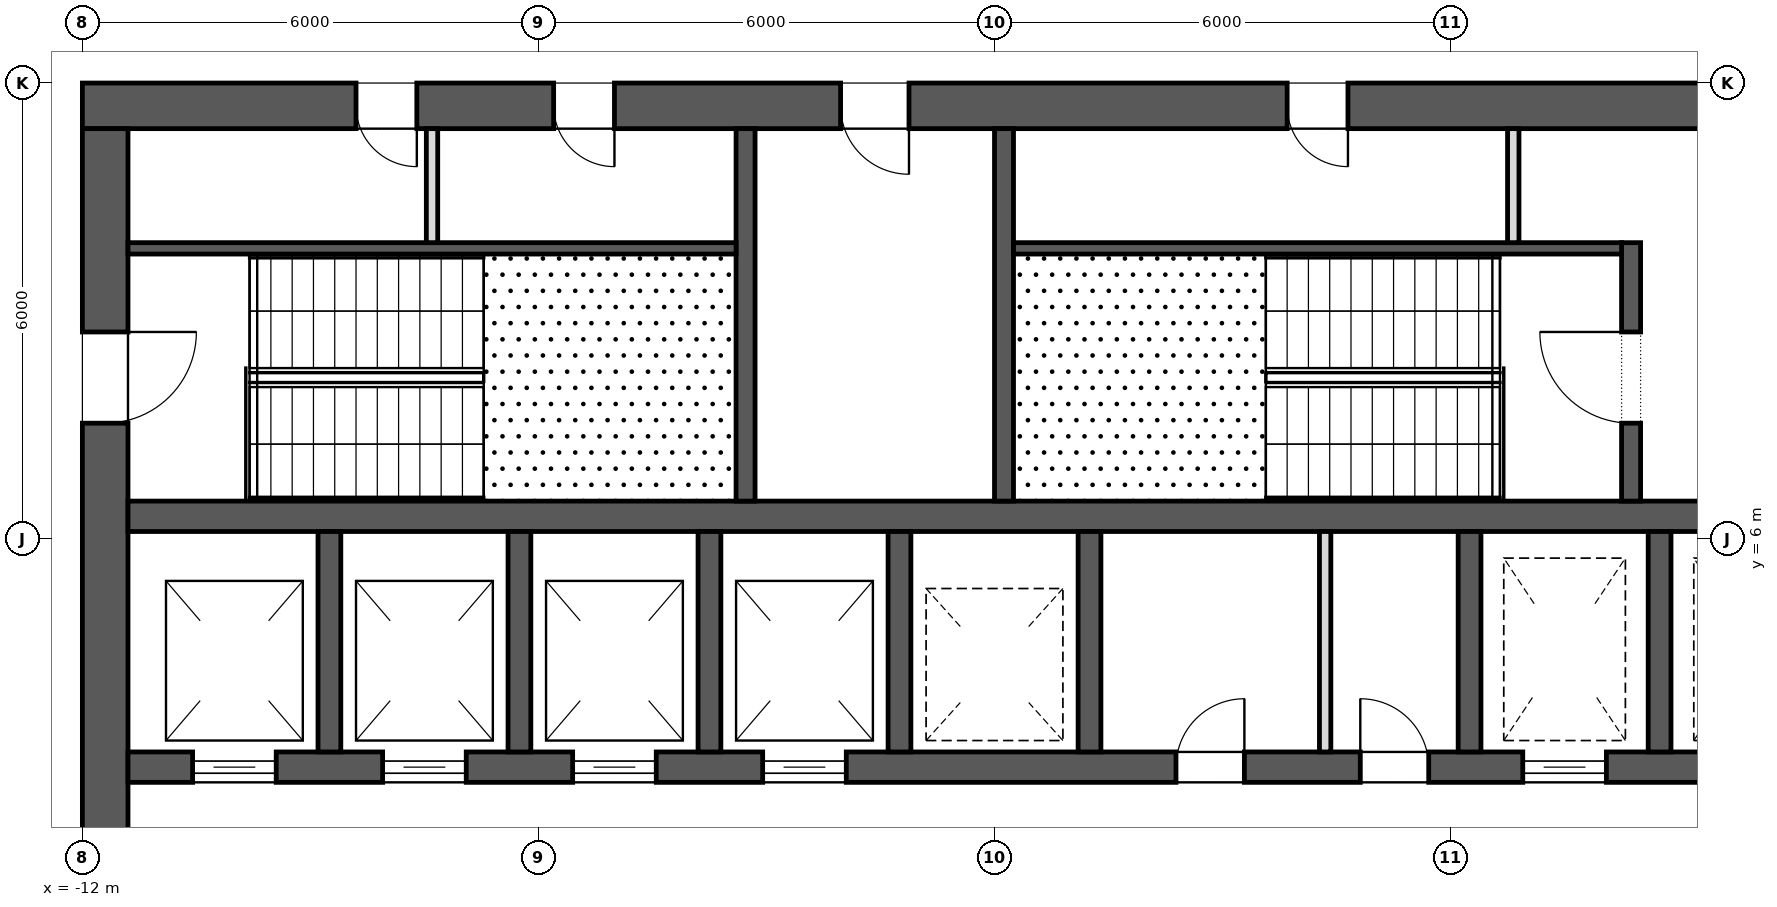
"""IFC4 building model, lengths in metres.
Left out: names, types, materials, properties, quantities, classifications, styles, units other than length and angle.
Written with IfcOpenShell. Run it as: python <this file> out.ifc"""

import sys

from ifc_helpers import new_model, si_unit, direction, frame, frame_2d, origin, place, context, subcontext, project, spatial, rectangle, extrude, element, fill, save


model = new_model("IFC4")
c1 = context("Model", 3, precision=1e-05, world=origin(), true_north=direction((0.0, 1.0)))
c2 = subcontext(c1, "Body", "Model", "MODEL_VIEW")
j1 = project(units=[si_unit("LENGTHUNIT", "METRE"), si_unit("PLANEANGLEUNIT", "RADIAN")], contexts=[c1])
p1 = place(None, origin())
s1 = spatial("IfcSite", under=j1, at=p1, CompositionType="ELEMENT")
p2 = place(p1, origin())
s2 = spatial("IfcBuilding", under=s1, at=p2, CompositionType="ELEMENT")
p3 = place(p2, frame((0.0, 0.0, 190.9)))
s3 = spatial("IfcBuildingStorey", under=s2, at=p3, CompositionType="ELEMENT", Elevation=190.9)
p4 = place(p3, frame((-12.0, 11.7, 0.0), z_axis=(0.0, 0.0, 1.0), x_axis=(1.0, 0.0, 0.0)))
e1 = element("IfcWall", 1, at=p4, inside=s3, PredefinedType="SHEAR", context=c2, shape_type="SweptSolid", body=[
    extrude(rectangle(XDim=24.0, YDim=0.6, at=frame_2d((12.0, 0.0))), origin(), (0.0, 0.0, 1.0), 4.0),
])
p5 = place(p4, frame((9.975, 0.0, 0.0)))
e2 = element("IfcOpeningElement", 2, at=p5, cuts=e1, PredefinedType="OPENING", context=c2, shape_type="SweptSolid", body=[
    extrude(rectangle(XDim=0.9, YDim=2.1, at=frame_2d((0.45, 1.05))), frame((0.0, 0.312, 0.0), z_axis=(0.0, -1.0, 0.0), x_axis=(1.0, 0.0, 0.0)), (0.0, 0.0, 1.0), 0.624),
])
p6 = place(p4, frame((3.6, 0.0, 0.0)))
e3 = element("IfcOpeningElement", 3, at=p6, cuts=e1, PredefinedType="OPENING", context=c2, shape_type="SweptSolid", body=[
    extrude(rectangle(XDim=0.8, YDim=2.1, at=frame_2d((0.4, 1.05))), frame((0.0, 0.312, 0.0), z_axis=(0.0, -1.0, 0.0), x_axis=(1.0, 0.0, 0.0)), (0.0, 0.0, 1.0), 0.624),
])
p7 = place(p4, frame((6.2, 0.0, 0.0)))
e4 = element("IfcOpeningElement", 4, at=p7, cuts=e1, PredefinedType="OPENING", context=c2, shape_type="SweptSolid", body=[
    extrude(rectangle(XDim=0.8, YDim=2.1, at=frame_2d((0.4, 1.05))), frame((0.0, 0.312, 0.0), z_axis=(0.0, -1.0, 0.0), x_axis=(1.0, 0.0, 0.0)), (0.0, 0.0, 1.0), 0.624),
])
p8 = place(p4, frame((15.85, 0.0, 0.0)))
e5 = element("IfcOpeningElement", 5, at=p8, cuts=e1, PredefinedType="OPENING", context=c2, shape_type="SweptSolid", body=[
    extrude(rectangle(XDim=0.8, YDim=2.1, at=frame_2d((0.4, 1.05))), frame((0.0, 0.312, 0.0), z_axis=(0.0, -1.0, 0.0), x_axis=(1.0, 0.0, 0.0)), (0.0, 0.0, 1.0), 0.624),
])
p9 = place(p3, frame((-11.7, -11.4, 0.0), z_axis=(0.0, 0.0, 1.0), x_axis=(0.0, 1.0, 0.0)))
e6 = element("IfcWall", 6, at=p9, inside=s3, PredefinedType="SHEAR", context=c2, shape_type="SweptSolid", body=[
    extrude(rectangle(XDim=22.8, YDim=0.6, at=frame_2d((11.4, 0.0))), origin(), (0.0, 0.0, 1.0), 4.0),
])
p10 = place(p9, frame((10.2, 0.0, 0.0)))
e7 = element("IfcOpeningElement", 7, at=p10, cuts=e6, PredefinedType="OPENING", context=c2, shape_type="SweptSolid", body=[
    extrude(rectangle(XDim=2.4, YDim=2.1, at=frame_2d((1.2, 1.05))), frame((0.0, 0.312, 0.0), z_axis=(0.0, -1.0, 0.0), x_axis=(1.0, 0.0, 0.0)), (0.0, 0.0, 1.0), 0.624),
])
p11 = place(p9, frame((18.925, 0.0, 0.0)))
e8 = element("IfcOpeningElement", 8, at=p11, cuts=e6, PredefinedType="OPENING", context=c2, shape_type="SweptSolid", body=[
    extrude(rectangle(XDim=1.2, YDim=2.1, at=frame_2d((0.6, 1.05))), frame((0.0, 0.312, 0.0), z_axis=(0.0, -1.0, 0.0), x_axis=(1.0, 0.0, 0.0)), (0.0, 0.0, 1.0), 0.624),
])
p12 = place(p9, frame((2.675, 0.0, 0.0)))
e9 = element("IfcOpeningElement", 9, at=p12, cuts=e6, PredefinedType="OPENING", context=c2, shape_type="SweptSolid", body=[
    extrude(rectangle(XDim=1.2, YDim=2.1, at=frame_2d((0.6, 1.05))), frame((0.0, 0.312, 0.0), z_axis=(0.0, -1.0, 0.0), x_axis=(1.0, 0.0, 0.0)), (0.0, 0.0, 1.0), 0.624),
])
p13 = place(p3, frame((-11.4, 3.0, 0.0), z_axis=(0.0, 0.0, 1.0), x_axis=(1.0, 0.0, 0.0)))
e10 = element("IfcWall", 10, at=p13, inside=s3, PredefinedType="SHEAR", context=c2, shape_type="SweptSolid", body=[
    extrude(rectangle(XDim=22.8, YDim=0.4, at=frame_2d((11.4, 0.0))), origin(), (0.0, 0.0, 1.0), 4.0),
])
p14 = place(p13, frame((0.85, 0.0, 0.0)))
e11 = element("IfcOpeningElement", 11, at=p14, cuts=e10, PredefinedType="OPENING", context=c2, shape_type="SweptSolid", body=[
    extrude(rectangle(XDim=1.1, YDim=2.1, at=frame_2d((0.55, 1.05))), frame((0.0, 0.212, 0.0), z_axis=(0.0, -1.0, 0.0), x_axis=(1.0, 0.0, 0.0)), (0.0, 0.0, 1.0), 0.424),
])
p15 = place(p13, frame((3.35, 0.0, 0.0)))
e12 = element("IfcOpeningElement", 12, at=p15, cuts=e10, PredefinedType="OPENING", context=c2, shape_type="SweptSolid", body=[
    extrude(rectangle(XDim=1.1, YDim=2.1, at=frame_2d((0.55, 1.05))), frame((0.0, 0.212, 0.0), z_axis=(0.0, -1.0, 0.0), x_axis=(1.0, 0.0, 0.0)), (0.0, 0.0, 1.0), 0.424),
])
p16 = place(p13, frame((5.85, 0.0, 0.0)))
e13 = element("IfcOpeningElement", 13, at=p16, cuts=e10, PredefinedType="OPENING", context=c2, shape_type="SweptSolid", body=[
    extrude(rectangle(XDim=1.1, YDim=2.1, at=frame_2d((0.55, 1.05))), frame((0.0, 0.212, 0.0), z_axis=(0.0, -1.0, 0.0), x_axis=(1.0, 0.0, 0.0)), (0.0, 0.0, 1.0), 0.424),
])
p17 = place(p13, frame((8.35, 0.0, 0.0)))
e14 = element("IfcOpeningElement", 14, at=p17, cuts=e10, PredefinedType="OPENING", context=c2, shape_type="SweptSolid", body=[
    extrude(rectangle(XDim=1.1, YDim=2.1, at=frame_2d((0.55, 1.05))), frame((0.0, 0.212, 0.0), z_axis=(0.0, -1.0, 0.0), x_axis=(1.0, 0.0, 0.0)), (0.0, 0.0, 1.0), 0.424),
])
p18 = place(p13, frame((18.35, 0.0, 0.0)))
e15 = element("IfcOpeningElement", 15, at=p18, cuts=e10, PredefinedType="OPENING", context=c2, shape_type="SweptSolid", body=[
    extrude(rectangle(XDim=1.1, YDim=2.1, at=frame_2d((0.55, 1.05))), frame((0.0, 0.212, 0.0), z_axis=(0.0, -1.0, 0.0), x_axis=(1.0, 0.0, 0.0)), (0.0, 0.0, 1.0), 0.424),
])
p19 = place(p13, frame((13.788, 0.0, 0.0)))
e16 = element("IfcOpeningElement", 16, at=p19, cuts=e10, PredefinedType="OPENING", context=c2, shape_type="SweptSolid", body=[
    extrude(rectangle(XDim=0.9, YDim=2.1, at=frame_2d((0.45, 1.05))), frame((0.0, 0.212, 0.0), z_axis=(0.0, -1.0, 0.0), x_axis=(1.0, 0.0, 0.0)), (0.0, 0.0, 1.0), 0.424),
])
p20 = place(p13, frame((16.212, 0.0, 0.0)))
e17 = element("IfcOpeningElement", 17, at=p20, cuts=e10, PredefinedType="OPENING", context=c2, shape_type="SweptSolid", body=[
    extrude(rectangle(XDim=0.9, YDim=2.1, at=frame_2d((0.45, 1.05))), frame((0.0, 0.212, 0.0), z_axis=(0.0, -1.0, 0.0), x_axis=(1.0, 0.0, 0.0)), (0.0, 0.0, 1.0), 0.424),
])
p21 = place(p3, frame((-11.4, 6.3, 0.0), z_axis=(0.0, 0.0, 1.0), x_axis=(1.0, 0.0, 0.0)))
e18 = element("IfcWall", 18, at=p21, inside=s3, PredefinedType="SHEAR", context=c2, shape_type="SweptSolid", body=[
    extrude(rectangle(XDim=22.8, YDim=0.4, at=frame_2d((11.4, 0.0))), origin(), (0.0, 0.0, 1.0), 4.0),
])
p22 = place(p21, frame((20.85, 0.0, 0.0)))
e19 = element("IfcOpeningElement", 19, at=p22, cuts=e18, PredefinedType="OPENING", context=c2, shape_type="SweptSolid", body=[
    extrude(rectangle(XDim=1.1, YDim=2.1, at=frame_2d((0.55, 1.05))), frame((0.0, 0.212, 0.0), z_axis=(0.0, -1.0, 0.0), x_axis=(1.0, 0.0, 0.0)), (0.0, 0.0, 1.0), 0.424),
])
for number, where, z_axis, x_axis in (
    (20, (-8.75, 3.2, 0.0), (0.0, 0.0, 1.0), (0.0, 1.0, 0.0)),
    (21, (-6.25, 3.2, 0.0), (0.0, 0.0, 1.0), (0.0, 1.0, 0.0)),
    (22, (-3.75, 3.2, 0.0), (0.0, 0.0, 1.0), (0.0, 1.0, 0.0)),
    (23, (-1.25, 3.2, 0.0), (0.0, 0.0, 1.0), (0.0, 1.0, 0.0)),
    (24, (1.25, 3.2, 0.0), (0.0, 0.0, 1.0), (0.0, 1.0, 0.0)),
    (25, (6.25, 3.2, 0.0), (0.0, 0.0, 1.0), (0.0, 1.0, 0.0)),
    (26, (8.75, 3.2, 0.0), (0.0, 0.0, 1.0), (0.0, 1.0, 0.0)),
):
    element("IfcWall", number, at=place(p3, frame(where, z_axis=z_axis, x_axis=x_axis)), inside=s3, PredefinedType="SHEAR", context=c2, shape_type="SweptSolid", body=[
        extrude(rectangle(XDim=2.9, YDim=0.3, at=frame_2d((1.45, 0.0))), origin(), (0.0, 0.0, 1.0), 4.0),
    ])
for number, where, z_axis, x_axis in (
    (27, (-3.275, 6.5, 0.0), (0.0, 0.0, 1.0), (0.0, 1.0, 0.0)),
    (28, (0.125, 6.5, 0.0), (0.0, 0.0, 1.0), (0.0, 1.0, 0.0)),
):
    element("IfcWall", number, at=place(p3, frame(where, z_axis=z_axis, x_axis=x_axis)), inside=s3, PredefinedType="SHEAR", context=c2, shape_type="SweptSolid", body=[
        extrude(rectangle(XDim=4.9, YDim=0.25, at=frame_2d((2.45, 0.0))), origin(), (0.0, 0.0, 1.0), 3.7),
    ])
p23 = place(p3, frame((8.375, 6.5, 0.0), z_axis=(0.0, 0.0, 1.0), x_axis=(0.0, 1.0, 0.0)))
e29 = element("IfcWall", 29, at=p23, inside=s3, PredefinedType="SHEAR", context=c2, shape_type="SweptSolid", body=[
    extrude(rectangle(XDim=3.4, YDim=0.25, at=frame_2d((1.7, 0.0))), origin(), (0.0, 0.0, 1.0), 3.7),
])
p24 = place(p23, frame((1.025, 0.0, 0.0)))
e30 = element("IfcOpeningElement", 30, at=p24, cuts=e29, PredefinedType="OPENING", context=c2, shape_type="SweptSolid", body=[
    extrude(rectangle(XDim=1.2, YDim=2.1, at=frame_2d((0.6, 1.05))), frame((0.0, 0.137, 0.0), z_axis=(0.0, -1.0, 0.0), x_axis=(1.0, 0.0, 0.0)), (0.0, 0.0, 1.0), 0.274),
])
for number, where, z_axis, x_axis in (
    (31, (-11.4, 9.825, 0.0), (0.0, 0.0, 1.0), (1.0, 0.0, 0.0)),
    (32, (0.25, 9.825, 0.0), (0.0, 0.0, 1.0), (1.0, 0.0, 0.0)),
):
    element("IfcWall", number, at=place(p3, frame(where, z_axis=z_axis, x_axis=x_axis)), inside=s3, PredefinedType="SHEAR", context=c2, shape_type="SweptSolid", body=[
        extrude(rectangle(XDim=8.0, YDim=0.15, at=frame_2d((4.0, 0.0))), origin(), (0.0, 0.0, 1.0), 3.7),
    ])
for number, where, z_axis, x_axis in (
    (33, (-7.4, 9.9, 0.0), (0.0, 0.0, 1.0), (0.0, 1.0, 0.0)),
    (34, (6.825, 9.9, 0.0), (0.0, 0.0, 1.0), (0.0, 1.0, 0.0)),
):
    element("IfcWall", number, at=place(p3, frame(where, z_axis=z_axis, x_axis=x_axis)), inside=s3, PredefinedType="PARTITIONING", context=c2, shape_type="SweptSolid", body=[
        extrude(rectangle(XDim=1.5, YDim=0.15, at=frame_2d((0.75, 0.0))), origin(), (0.0, 0.0, 1.0), 3.7),
    ])
p25 = place(p3, frame((4.35, 3.2, 0.0), z_axis=(0.0, 0.0, 1.0), x_axis=(0.0, 1.0, 0.0)))
e35 = element("IfcWall", 35, at=p25, inside=s3, PredefinedType="PARTITIONING", context=c2, shape_type="SweptSolid", body=[
    extrude(rectangle(XDim=2.9, YDim=0.15, at=frame_2d((1.45, 0.0))), origin(), (0.0, 0.0, 1.0), 3.7),
])
p26 = place(p14, origin())
e36 = element("IfcDoor", 36, at=p26, inside=s3, OperationType="SLIDING_TO_LEFT", PredefinedType="DOOR", context=c2, shape_type="SweptSolid", body=[
    extrude(rectangle(XDim=1.1, YDim=2.1, at=frame_2d((0.55, 1.05))), frame((0.0, 0.025, 0.0), z_axis=(0.0, -1.0, 0.0), x_axis=(1.0, 0.0, 0.0)), (0.0, 0.0, 1.0), 0.05),
])
fill(e11, e36)
p27 = place(p15, origin())
e37 = element("IfcDoor", 37, at=p27, inside=s3, OperationType="SLIDING_TO_LEFT", PredefinedType="DOOR", context=c2, shape_type="SweptSolid", body=[
    extrude(rectangle(XDim=1.1, YDim=2.1, at=frame_2d((0.55, 1.05))), frame((0.0, 0.025, 0.0), z_axis=(0.0, -1.0, 0.0), x_axis=(1.0, 0.0, 0.0)), (0.0, 0.0, 1.0), 0.05),
])
fill(e12, e37)
p28 = place(p16, origin())
e38 = element("IfcDoor", 38, at=p28, inside=s3, OperationType="SLIDING_TO_LEFT", PredefinedType="DOOR", context=c2, shape_type="SweptSolid", body=[
    extrude(rectangle(XDim=1.1, YDim=2.1, at=frame_2d((0.55, 1.05))), frame((0.0, 0.025, 0.0), z_axis=(0.0, -1.0, 0.0), x_axis=(1.0, 0.0, 0.0)), (0.0, 0.0, 1.0), 0.05),
])
fill(e13, e38)
p29 = place(p17, origin())
e39 = element("IfcDoor", 39, at=p29, inside=s3, OperationType="SLIDING_TO_LEFT", PredefinedType="DOOR", context=c2, shape_type="SweptSolid", body=[
    extrude(rectangle(XDim=1.1, YDim=2.1, at=frame_2d((0.55, 1.05))), frame((0.0, 0.025, 0.0), z_axis=(0.0, -1.0, 0.0), x_axis=(1.0, 0.0, 0.0)), (0.0, 0.0, 1.0), 0.05),
])
fill(e14, e39)
p30 = place(p18, origin())
e40 = element("IfcDoor", 40, at=p30, inside=s3, OperationType="SLIDING_TO_LEFT", PredefinedType="DOOR", context=c2, shape_type="SweptSolid", body=[
    extrude(rectangle(XDim=1.1, YDim=2.1, at=frame_2d((0.55, 1.05))), frame((0.0, 0.025, 0.0), z_axis=(0.0, -1.0, 0.0), x_axis=(1.0, 0.0, 0.0)), (0.0, 0.0, 1.0), 0.05),
])
fill(e15, e40)
p31 = place(p11, frame((1.2, 0.0, 0.0), z_axis=(0.0, 0.0, 1.0), x_axis=(-1.0, 0.0, 0.0)))
e41 = element("IfcDoor", 41, at=p31, inside=s3, OperationType="SINGLE_SWING_RIGHT", PredefinedType="DOOR", context=c2, shape_type="SweptSolid", body=[
    extrude(rectangle(XDim=1.2, YDim=2.1, at=frame_2d((0.6, 1.05))), frame((0.0, 0.025, 0.0), z_axis=(0.0, -1.0, 0.0), x_axis=(1.0, 0.0, 0.0)), (0.0, 0.0, 1.0), 0.05),
])
fill(e8, e41)
p32 = place(p24, origin())
e42 = element("IfcDoor", 42, at=p32, inside=s3, OperationType="SINGLE_SWING_LEFT", PredefinedType="DOOR", context=c2, shape_type="SweptSolid", body=[
    extrude(rectangle(XDim=1.2, YDim=2.1, at=frame_2d((0.6, 1.05))), frame((0.0, 0.025, 0.0), z_axis=(0.0, -1.0, 0.0), x_axis=(1.0, 0.0, 0.0)), (0.0, 0.0, 1.0), 0.05),
])
fill(e30, e42)
p33 = place(p5, frame((0.9, 0.0, 0.0), z_axis=(0.0, 0.0, 1.0), x_axis=(-1.0, 0.0, 0.0)))
e43 = element("IfcDoor", 43, at=p33, inside=s3, OperationType="SINGLE_SWING_RIGHT", PredefinedType="DOOR", context=c2, shape_type="SweptSolid", body=[
    extrude(rectangle(XDim=0.9, YDim=2.1, at=frame_2d((0.45, 1.05))), frame((0.0, 0.025, 0.0), z_axis=(0.0, -1.0, 0.0), x_axis=(1.0, 0.0, 0.0)), (0.0, 0.0, 1.0), 0.05),
])
fill(e2, e43)
p34 = place(p6, frame((0.8, 0.0, 0.0), z_axis=(0.0, 0.0, 1.0), x_axis=(-1.0, 0.0, 0.0)))
e44 = element("IfcDoor", 44, at=p34, inside=s3, OperationType="SINGLE_SWING_RIGHT", PredefinedType="DOOR", context=c2, shape_type="SweptSolid", body=[
    extrude(rectangle(XDim=0.8, YDim=2.1, at=frame_2d((0.4, 1.05))), frame((0.0, 0.025, 0.0), z_axis=(0.0, -1.0, 0.0), x_axis=(1.0, 0.0, 0.0)), (0.0, 0.0, 1.0), 0.05),
])
fill(e3, e44)
p35 = place(p7, frame((0.8, 0.0, 0.0), z_axis=(0.0, 0.0, 1.0), x_axis=(-1.0, 0.0, 0.0)))
e45 = element("IfcDoor", 45, at=p35, inside=s3, OperationType="SINGLE_SWING_RIGHT", PredefinedType="DOOR", context=c2, shape_type="SweptSolid", body=[
    extrude(rectangle(XDim=0.8, YDim=2.1, at=frame_2d((0.4, 1.05))), frame((0.0, 0.025, 0.0), z_axis=(0.0, -1.0, 0.0), x_axis=(1.0, 0.0, 0.0)), (0.0, 0.0, 1.0), 0.05),
])
fill(e4, e45)
p36 = place(p8, frame((0.8, 0.0, 0.0), z_axis=(0.0, 0.0, 1.0), x_axis=(-1.0, 0.0, 0.0)))
e46 = element("IfcDoor", 46, at=p36, inside=s3, OperationType="SINGLE_SWING_RIGHT", PredefinedType="DOOR", context=c2, shape_type="SweptSolid", body=[
    extrude(rectangle(XDim=0.8, YDim=2.1, at=frame_2d((0.4, 1.05))), frame((0.0, 0.025, 0.0), z_axis=(0.0, -1.0, 0.0), x_axis=(1.0, 0.0, 0.0)), (0.0, 0.0, 1.0), 0.05),
])
fill(e5, e46)
p37 = place(p19, origin())
e47 = element("IfcDoor", 47, at=p37, inside=s3, OperationType="SINGLE_SWING_LEFT", PredefinedType="DOOR", context=c2, shape_type="SweptSolid", body=[
    extrude(rectangle(XDim=0.9, YDim=2.1, at=frame_2d((0.45, 1.05))), frame((0.0, 0.025, 0.0), z_axis=(0.0, -1.0, 0.0), x_axis=(1.0, 0.0, 0.0)), (0.0, 0.0, 1.0), 0.05),
])
fill(e16, e47)
p38 = place(p20, origin())
e48 = element("IfcDoor", 48, at=p38, inside=s3, OperationType="SINGLE_SWING_RIGHT", PredefinedType="DOOR", context=c2, shape_type="SweptSolid", body=[
    extrude(rectangle(XDim=0.9, YDim=2.1, at=frame_2d((0.45, 1.05))), frame((0.0, 0.025, 0.0), z_axis=(0.0, -1.0, 0.0), x_axis=(1.0, 0.0, 0.0)), (0.0, 0.0, 1.0), 0.05),
])
fill(e17, e48)
save(model, sys.argv[1])
